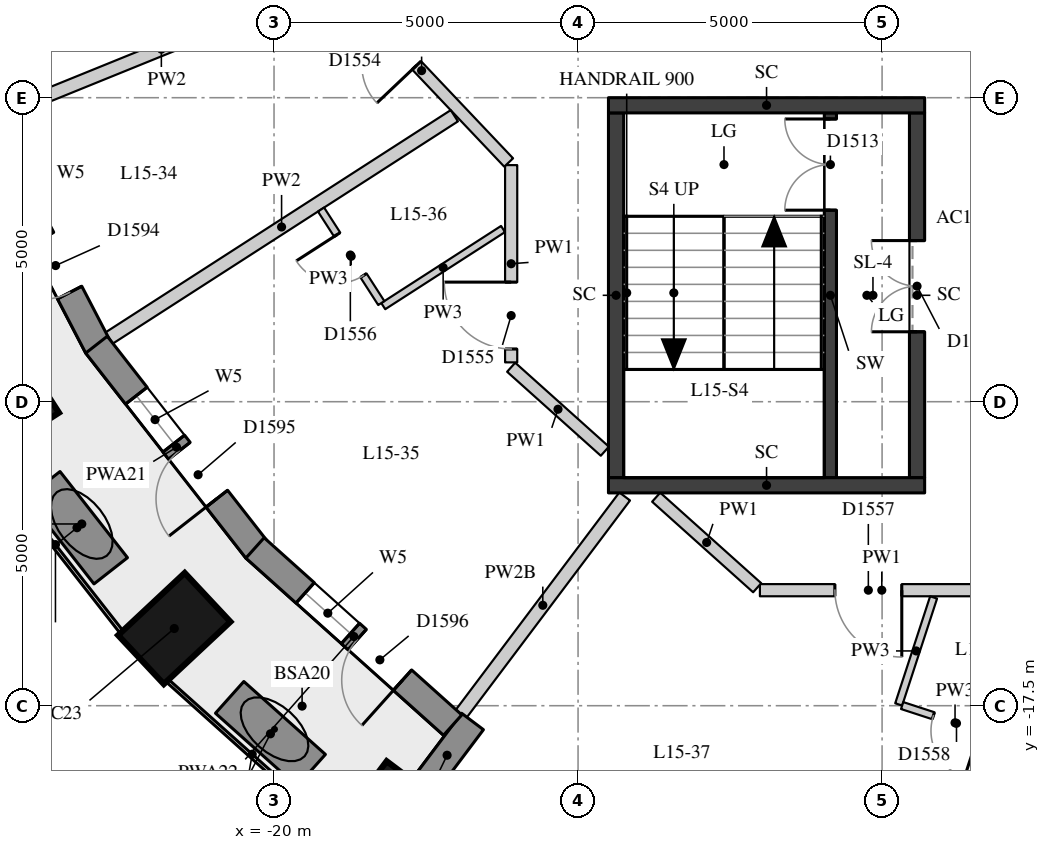
"""IFC4 building model, lengths in metres.
Left out: names, types, materials, properties, quantities, classifications, styles, units other than length and angle.
Written with IfcOpenShell. Run it as: python <this file> out.ifc"""

import sys

from ifc_helpers import new_model, si_unit, direction, frame, frame_2d, origin, origin_2d, place, context, subcontext, project, spatial, rectangle, extrude, element, fill, save


model = new_model("IFC4")
c1 = context("Model", 3, precision=1e-05, world=origin(), true_north=direction((0.0, 1.0)))
c2 = subcontext(c1, "Body", "Model", "MODEL_VIEW")
j1 = project(units=[si_unit("LENGTHUNIT", "METRE"), si_unit("PLANEANGLEUNIT", "RADIAN")], contexts=[c1])
p1 = place(None, origin())
s1 = spatial("IfcSite", under=j1, at=p1, CompositionType="ELEMENT")
p2 = place(p1, origin())
s2 = spatial("IfcBuilding", under=s1, at=p2, CompositionType="ELEMENT")
p3 = place(p2, frame((0.0, 0.0, 58.0)))
s3 = spatial("IfcBuildingStorey", under=s2, at=p3, CompositionType="ELEMENT", Elevation=58.0)
for number, where, z_axis, x_axis in (
    (1, (-24.465, -12.625, 0.0), (0.0, 0.0, 1.0), (-0.841, -0.541, 0.0)),
    (2, (-21.641, -16.23, 0.0), (0.0, 0.0, 1.0), (-0.73, -0.683, 0.0)),
    (3, (-18.159, -19.343, 0.0), (0.0, 0.0, 1.0), (-0.601, -0.799, 0.0)),
):
    element("IfcColumn", number, at=place(p3, frame(where, z_axis=z_axis, x_axis=x_axis)), inside=s3, PredefinedType="COLUMN", context=c2, shape_type="SweptSolid", body=[
        extrude(rectangle(XDim=1.5, YDim=1.1, at=origin_2d()), origin(), (0.0, 0.0, 1.0), 3.3),
    ])
p4 = place(p3, frame((-17.572, -18.871, 0.0), z_axis=(0.0, 0.0, 1.0), x_axis=(0.601262851241, 0.799051302306, 0.0)))
e4 = element("IfcWall", 4, at=p4, inside=s3, PredefinedType="SOLIDWALL", context=c2, shape_type="SweptSolid", body=[
    extrude(rectangle(XDim=1.391, YDim=0.45, at=frame_2d((0.696, 0.0))), origin(), (0.0, 0.0, 1.0), 2.57),
])
p5 = place(p3, frame((-24.818, -7.905, 0.0), z_axis=(0.0, 0.0, 1.0), x_axis=(0.461517123562, -0.887131300687, 0.0)))
e5 = element("IfcWall", 5, at=p5, inside=s3, PredefinedType="SOLIDWALL", context=c2, shape_type="SweptSolid", body=[
    extrude(rectangle(XDim=4.162, YDim=0.45, at=frame_2d((2.081, 0.0))), origin(), (0.0, 0.0, 1.0), 3.02),
])
p6 = place(p5, frame((1.006, 0.0, 0.4)))
e6 = element("IfcOpeningElement", 6, at=p6, cuts=e5, PredefinedType="OPENING", context=c2, shape_type="SweptSolid", body=[
    extrude(rectangle(XDim=1.0, YDim=1.75, at=frame_2d((0.5, 0.875))), frame((0.0, 0.235, 0.0), z_axis=(0.0, -1.0, 0.0), x_axis=(1.0, 0.0, 0.0)), (0.0, 0.0, 1.0), 0.47),
])
p7 = place(p5, frame((2.156, 0.0, 0.0)))
e7 = element("IfcOpeningElement", 7, at=p7, cuts=e5, PredefinedType="OPENING", context=c2, shape_type="SweptSolid", body=[
    extrude(rectangle(XDim=1.0, YDim=2.15, at=frame_2d((0.5, 1.075))), frame((0.0, 0.235, 0.0), z_axis=(0.0, -1.0, 0.0), x_axis=(1.0, 0.0, 0.0)), (0.0, 0.0, 1.0), 0.47),
])
p8 = place(p3, frame((-22.92, -11.562, 0.0), z_axis=(0.0, 0.0, 1.0), x_axis=(0.615586464456, -0.788069352772, 0.0)))
e8 = element("IfcWall", 8, at=p8, inside=s3, PredefinedType="SOLIDWALL", context=c2, shape_type="SweptSolid", body=[
    extrude(rectangle(XDim=4.279, YDim=0.45, at=frame_2d((2.139, 0.0))), origin(), (0.0, 0.0, 1.0), 3.02),
])
p9 = place(p8, frame((1.064, 0.0, 0.4)))
e9 = element("IfcOpeningElement", 9, at=p9, cuts=e8, PredefinedType="OPENING", context=c2, shape_type="SweptSolid", body=[
    extrude(rectangle(XDim=1.0, YDim=1.75, at=frame_2d((0.5, 0.875))), frame((0.0, 0.235, 0.0), z_axis=(0.0, -1.0, 0.0), x_axis=(1.0, 0.0, 0.0)), (0.0, 0.0, 1.0), 0.47),
])
p10 = place(p8, frame((2.214, 0.0, 0.0)))
e10 = element("IfcOpeningElement", 10, at=p10, cuts=e8, PredefinedType="OPENING", context=c2, shape_type="SweptSolid", body=[
    extrude(rectangle(XDim=1.0, YDim=2.15, at=frame_2d((0.5, 1.075))), frame((0.0, 0.235, 0.0), z_axis=(0.0, -1.0, 0.0), x_axis=(1.0, 0.0, 0.0)), (0.0, 0.0, 1.0), 0.47),
])
p11 = place(p3, frame((-20.313, -14.905, 0.0), z_axis=(0.0, 0.0, 1.0), x_axis=(0.744616407434, -0.667492626012, 0.0)))
e11 = element("IfcWall", 11, at=p11, inside=s3, PredefinedType="SOLIDWALL", context=c2, shape_type="SweptSolid", body=[
    extrude(rectangle(XDim=4.365, YDim=0.45, at=frame_2d((2.183, 0.0))), origin(), (0.0, 0.0, 1.0), 3.02),
])
p12 = place(p11, frame((1.108, 0.0, 0.4)))
e12 = element("IfcOpeningElement", 12, at=p12, cuts=e11, PredefinedType="OPENING", context=c2, shape_type="SweptSolid", body=[
    extrude(rectangle(XDim=1.0, YDim=1.75, at=frame_2d((0.5, 0.875))), frame((0.0, 0.235, 0.0), z_axis=(0.0, -1.0, 0.0), x_axis=(1.0, 0.0, 0.0)), (0.0, 0.0, 1.0), 0.47),
])
p13 = place(p11, frame((2.258, 0.0, 0.0)))
e13 = element("IfcOpeningElement", 13, at=p13, cuts=e11, PredefinedType="OPENING", context=c2, shape_type="SweptSolid", body=[
    extrude(rectangle(XDim=1.0, YDim=2.15, at=frame_2d((0.5, 1.075))), frame((0.0, 0.235, 0.0), z_axis=(0.0, -1.0, 0.0), x_axis=(1.0, 0.0, 0.0)), (0.0, 0.0, 1.0), 0.47),
])
p14 = place(p3, frame((-23.795, -13.864, 0.0), z_axis=(0.0, 0.0, 1.0), x_axis=(0.616622746332, -0.787258781282, 0.0)))
e14 = element("IfcWall", 14, at=p14, inside=s3, PredefinedType="USERDEFINED", context=c2, shape_type="SweptSolid", body=[
    extrude(rectangle(XDim=1.8, YDim=0.7, at=frame_2d((0.9, 0.0))), origin(), (0.0, 0.0, 1.0), 0.75),
])
p15 = place(p3, frame((-20.73, -17.363, 0.0), z_axis=(0.0, 0.0, 1.0), x_axis=(0.745535653445, -0.666465745139, 0.0)))
e15 = element("IfcWall", 15, at=p15, inside=s3, PredefinedType="USERDEFINED", context=c2, shape_type="SweptSolid", body=[
    extrude(rectangle(XDim=1.8, YDim=0.7, at=frame_2d((0.9, 0.0))), origin(), (0.0, 0.0, 1.0), 0.75),
])
p16 = place(p3, frame((-10.85, -13.75, 0.0), z_axis=(0.0, 0.0, 1.0), x_axis=(0.0, 1.0, 0.0)))
e16 = element("IfcWall", 16, at=p16, inside=s3, PredefinedType="SHEAR", context=c2, shape_type="SweptSolid", body=[
    extrude(rectangle(XDim=6.0, YDim=0.2, at=frame_2d((3.0, 0.0))), origin(), (0.0, 0.0, 1.0), 3.02),
])
p17 = place(p16, frame((4.4, 0.0, 0.0)))
e17 = element("IfcOpeningElement", 17, at=p17, cuts=e16, PredefinedType="OPENING", context=c2, shape_type="SweptSolid", body=[
    extrude(rectangle(XDim=1.5, YDim=2.1, at=frame_2d((0.75, 1.05))), frame((0.0, 0.11, 0.0), z_axis=(0.0, -1.0, 0.0), x_axis=(1.0, 0.0, 0.0)), (0.0, 0.0, 1.0), 0.22),
])
p18 = place(p3, frame((-14.375, -13.75, -0.28), z_axis=(0.0, 0.0, 1.0), x_axis=(0.0, 1.0, 0.0)))
e18 = element("IfcWall", 18, at=p18, inside=s3, PredefinedType="SHEAR", context=c2, shape_type="SweptSolid", body=[
    extrude(rectangle(XDim=6.0, YDim=0.25, at=frame_2d((3.0, 0.0))), origin(), (0.0, 0.0, 1.0), 3.3),
])
p19 = place(p3, frame((-9.425, -13.75, -0.28), z_axis=(0.0, 0.0, 1.0), x_axis=(0.0, 1.0, 0.0)))
e19 = element("IfcWall", 19, at=p19, inside=s3, PredefinedType="SHEAR", context=c2, shape_type="SweptSolid", body=[
    extrude(rectangle(XDim=6.0, YDim=0.25, at=frame_2d((3.0, 0.0))), origin(), (0.0, 0.0, 1.0), 3.3),
])
p20 = place(p19, frame((2.4, 0.0, 0.28)))
e20 = element("IfcOpeningElement", 20, at=p20, cuts=e19, PredefinedType="OPENING", context=c2, shape_type="SweptSolid", body=[
    extrude(rectangle(XDim=1.5, YDim=2.1, at=frame_2d((0.75, 1.05))), frame((0.0, 0.135, 0.0), z_axis=(0.0, -1.0, 0.0), x_axis=(1.0, 0.0, 0.0)), (0.0, 0.0, 1.0), 0.27),
])
for number, where, z_axis, x_axis in (
    (21, (-14.5, -7.625, -0.28), (0.0, 0.0, 1.0), (1.0, 0.0, 0.0)),
    (22, (-14.5, -13.875, -0.28), (0.0, 0.0, 1.0), (1.0, 0.0, 0.0)),
):
    element("IfcWall", number, at=place(p3, frame(where, z_axis=z_axis, x_axis=x_axis)), inside=s3, PredefinedType="SHEAR", context=c2, shape_type="SweptSolid", body=[
        extrude(rectangle(XDim=5.2, YDim=0.25, at=frame_2d((2.6, 0.0))), origin(), (0.0, 0.0, 1.0), 3.3),
    ])
p21 = place(p3, frame((-14.559, -13.314, 0.0), z_axis=(0.0, 0.0, 1.0), x_axis=(-0.744636171002, 0.667470578254, 0.0)))
e23 = element("IfcWall", 23, at=p21, inside=s3, PredefinedType="PARTITIONING", context=c2, shape_type="SweptSolid", body=[
    extrude(rectangle(XDim=2.069, YDim=0.2, at=frame_2d((1.035, 0.0))), origin(), (0.0, 0.0, 1.0), 3.02),
])
p22 = place(p3, frame((-16.1, -11.853, 0.0), z_axis=(0.0, 0.0, 1.0), x_axis=(0.0, 1.0, 0.0)))
e24 = element("IfcWall", 24, at=p22, inside=s3, PredefinedType="PARTITIONING", context=c2, shape_type="SweptSolid", body=[
    extrude(rectangle(XDim=3.244, YDim=0.2, at=frame_2d((1.622, 0.0))), origin(), (0.0, 0.0, 1.0), 3.02),
])
p23 = place(p22, frame((0.22, 0.0, 0.0)))
e25 = element("IfcOpeningElement", 25, at=p23, cuts=e24, PredefinedType="OPENING", context=c2, shape_type="SweptSolid", body=[
    extrude(rectangle(XDim=1.1, YDim=2.1, at=frame_2d((0.55, 1.05))), frame((0.0, 0.11, 0.0), z_axis=(0.0, -1.0, 0.0), x_axis=(1.0, 0.0, 0.0)), (0.0, 0.0, 1.0), 0.22),
])
p24 = place(p3, frame((-16.141, -8.566, 0.0), z_axis=(0.0, 0.0, 1.0), x_axis=(-0.687938220375, 0.725769250483, 0.0)))
e26 = element("IfcWall", 26, at=p24, inside=s3, PredefinedType="PARTITIONING", context=c2, shape_type="SweptSolid", body=[
    extrude(rectangle(XDim=4.162, YDim=0.2, at=frame_2d((2.081, 0.0))), origin(), (0.0, 0.0, 1.0), 3.02),
])
p25 = place(p24, frame((2.201, 0.0, 0.0)))
e27 = element("IfcOpeningElement", 27, at=p25, cuts=e26, PredefinedType="OPENING", context=c2, shape_type="SweptSolid", body=[
    extrude(rectangle(XDim=0.9, YDim=2.1, at=frame_2d((0.45, 1.05))), frame((0.0, 0.11, 0.0), z_axis=(0.0, -1.0, 0.0), x_axis=(1.0, 0.0, 0.0)), (0.0, 0.0, 1.0), 0.22),
])
p26 = place(p3, frame((-8.0, -15.6, 0.0), z_axis=(0.0, 0.0, 1.0), x_axis=(-1.0, 0.0, 0.0)))
e28 = element("IfcWall", 28, at=p26, inside=s3, PredefinedType="PARTITIONING", context=c2, shape_type="SweptSolid", body=[
    extrude(rectangle(XDim=4.009, YDim=0.2, at=frame_2d((2.005, 0.0))), origin(), (0.0, 0.0, 1.0), 3.02),
])
p27 = place(p26, frame((1.676, 0.0, 0.0)))
e29 = element("IfcOpeningElement", 29, at=p27, cuts=e28, PredefinedType="OPENING", context=c2, shape_type="SweptSolid", body=[
    extrude(rectangle(XDim=1.1, YDim=2.1, at=frame_2d((0.55, 1.05))), frame((0.0, 0.11, 0.0), z_axis=(0.0, -1.0, 0.0), x_axis=(1.0, 0.0, 0.0)), (0.0, 0.0, 1.0), 0.22),
])
p28 = place(p3, frame((-12.054, -15.56, 0.0), z_axis=(0.0, 0.0, 1.0), x_axis=(-0.744625700487, 0.66748225907, 0.0)))
e30 = element("IfcWall", 30, at=p28, inside=s3, PredefinedType="PARTITIONING", context=c2, shape_type="SweptSolid", body=[
    extrude(rectangle(XDim=2.231, YDim=0.2, at=frame_2d((1.116, 0.0))), origin(), (0.0, 0.0, 1.0), 3.02),
])
p29 = place(p3, frame((-24.609, -7.82, 0.0), z_axis=(0.0, 0.0, 1.0), x_axis=(0.926562262773, 0.376141427131, 0.0)))
e31 = element("IfcWall", 31, at=p29, inside=s3, PredefinedType="PARTITIONING", context=c2, shape_type="SweptSolid", body=[
    extrude(rectangle(XDim=5.948, YDim=0.22, at=frame_2d((2.974, 0.0))), origin(), (0.0, 0.0, 1.0), 3.02),
])
p30 = place(p3, frame((-22.717, -11.456, 0.0), z_axis=(0.0, 0.0, 1.0), x_axis=(0.840775666807, 0.541383669965, 0.0)))
e32 = element("IfcWall", 32, at=p30, inside=s3, PredefinedType="PARTITIONING", context=c2, shape_type="SweptSolid", body=[
    extrude(rectangle(XDim=6.759, YDim=0.22, at=frame_2d((3.379, 0.0))), origin(), (0.0, 0.0, 1.0), 3.02),
])
p31 = place(p3, frame((-16.927, -17.638, 0.0), z_axis=(0.0, 0.0, 1.0), x_axis=(0.601158965663, 0.799129462605, 0.0)))
e33 = element("IfcWall", 33, at=p31, inside=s3, PredefinedType="PARTITIONING", context=c2, shape_type="SweptSolid", body=[
    extrude(rectangle(XDim=4.48, YDim=0.22, at=frame_2d((2.24, 0.0))), origin(), (0.0, 0.0, 1.0), 2.57),
])
p32 = place(p3, frame((-9.429, -23.014, 0.0), z_axis=(0.0, 0.0, 1.0), x_axis=(0.310249775859, 0.950655077607, 0.0)))
e34 = element("IfcWall", 34, at=p32, inside=s3, PredefinedType="PARTITIONING", context=c2, shape_type="SweptSolid", body=[
    extrude(rectangle(XDim=7.85, YDim=0.22, at=frame_2d((3.925, 0.0))), origin(), (0.0, 0.0, 1.0), 3.02),
])
p33 = place(p3, frame((-16.234, -9.66, 0.0), z_axis=(0.0, 0.0, 1.0), x_axis=(-0.840731269954, -0.541452612628, 0.0)))
e35 = element("IfcWall", 35, at=p33, inside=s3, PredefinedType="PARTITIONING", context=c2, shape_type="SweptSolid", body=[
    extrude(rectangle(XDim=2.343, YDim=0.12, at=frame_2d((1.171, 0.0))), origin(), (0.0, 0.0, 1.0), 3.02),
])
p34 = place(p3, frame((-9.153, -15.719, 0.0), z_axis=(0.0, 0.0, 1.0), x_axis=(-0.310326382186, -0.950630073435, 0.0)))
e36 = element("IfcWall", 36, at=p34, inside=s3, PredefinedType="PARTITIONING", context=c2, shape_type="SweptSolid", body=[
    extrude(rectangle(XDim=1.851, YDim=0.12, at=frame_2d((0.926, 0.0))), origin(), (0.0, 0.0, 1.0), 3.02),
])
p35 = place(p3, frame((-18.236, -10.878, 0.0), z_axis=(0.0, 0.0, 1.0), x_axis=(-0.54164058606, 0.840610180484, 0.0)))
e37 = element("IfcWall", 37, at=p35, inside=s3, PredefinedType="PARTITIONING", context=c2, shape_type="SweptSolid", body=[
    extrude(rectangle(XDim=1.83, YDim=0.12, at=frame_2d((0.915, 0.0))), origin(), (0.0, 0.0, 1.0), 3.02),
])
p36 = place(p35, frame((0.54, 0.0, 0.0)))
e38 = element("IfcOpeningElement", 38, at=p36, cuts=e37, PredefinedType="OPENING", context=c2, shape_type="SweptSolid", body=[
    extrude(rectangle(XDim=0.8, YDim=2.1, at=frame_2d((0.4, 1.05))), frame((0.0, 0.07, 0.0), z_axis=(0.0, -1.0, 0.0), x_axis=(1.0, 0.0, 0.0)), (0.0, 0.0, 1.0), 0.14),
])
p37 = place(p3, frame((-9.67, -17.498, 0.0), z_axis=(0.0, 0.0, 1.0), x_axis=(0.950678536911, -0.31017788357, 0.0)))
e39 = element("IfcWall", 39, at=p37, inside=s3, PredefinedType="PARTITIONING", context=c2, shape_type="SweptSolid", body=[
    extrude(rectangle(XDim=1.83, YDim=0.12, at=frame_2d((0.915, 0.0))), origin(), (0.0, 0.0, 1.0), 3.02),
])
p38 = place(p37, frame((0.54, 0.0, 0.0)))
e40 = element("IfcOpeningElement", 40, at=p38, cuts=e39, PredefinedType="OPENING", context=c2, shape_type="SweptSolid", body=[
    extrude(rectangle(XDim=0.8, YDim=2.1, at=frame_2d((0.4, 1.05))), frame((0.0, 0.07, 0.0), z_axis=(0.0, -1.0, 0.0), x_axis=(1.0, 0.0, 0.0)), (0.0, 0.0, 1.0), 0.14),
])
p39 = place(p7, frame((1.0, 0.0, 0.0), z_axis=(0.0, 0.0, 1.0), x_axis=(-1.0, 0.0, 0.0)))
e41 = element("IfcDoor", 41, at=p39, inside=s3, OperationType="SINGLE_SWING_RIGHT", PredefinedType="DOOR", context=c2, shape_type="SweptSolid", body=[
    extrude(rectangle(XDim=1.0, YDim=2.15, at=frame_2d((0.5, 1.075))), frame((0.0, 0.075, 0.0), z_axis=(0.0, -1.0, 0.0), x_axis=(1.0, 0.0, 0.0)), (0.0, 0.0, 1.0), 0.05),
])
fill(e7, e41)
p40 = place(p9, origin())
e42 = element("IfcWindow", 42, at=p40, inside=s3, PartitioningType="SINGLE_PANEL", PredefinedType="WINDOW", context=c2, shape_type="SweptSolid", body=[
    extrude(rectangle(XDim=1.0, YDim=1.75, at=frame_2d((0.5, 0.875))), frame((0.0, 0.035, 0.0), z_axis=(0.0, -1.0, 0.0), x_axis=(1.0, 0.0, 0.0)), (0.0, 0.0, 1.0), 0.06),
])
fill(e9, e42)
p41 = place(p10, frame((1.0, 0.0, 0.0), z_axis=(0.0, 0.0, 1.0), x_axis=(-1.0, 0.0, 0.0)))
e43 = element("IfcDoor", 43, at=p41, inside=s3, OperationType="SINGLE_SWING_LEFT", PredefinedType="DOOR", context=c2, shape_type="SweptSolid", body=[
    extrude(rectangle(XDim=1.0, YDim=2.15, at=frame_2d((0.5, 1.075))), frame((0.0, 0.075, 0.0), z_axis=(0.0, -1.0, 0.0), x_axis=(1.0, 0.0, 0.0)), (0.0, 0.0, 1.0), 0.05),
])
fill(e10, e43)
p42 = place(p12, origin())
e44 = element("IfcWindow", 44, at=p42, inside=s3, PartitioningType="SINGLE_PANEL", PredefinedType="WINDOW", context=c2, shape_type="SweptSolid", body=[
    extrude(rectangle(XDim=1.0, YDim=1.75, at=frame_2d((0.5, 0.875))), frame((0.0, 0.035, 0.0), z_axis=(0.0, -1.0, 0.0), x_axis=(1.0, 0.0, 0.0)), (0.0, 0.0, 1.0), 0.06),
])
fill(e12, e44)
p43 = place(p13, frame((1.0, 0.0, 0.0), z_axis=(0.0, 0.0, 1.0), x_axis=(-1.0, 0.0, 0.0)))
e45 = element("IfcDoor", 45, at=p43, inside=s3, OperationType="SINGLE_SWING_LEFT", PredefinedType="DOOR", context=c2, shape_type="SweptSolid", body=[
    extrude(rectangle(XDim=1.0, YDim=2.15, at=frame_2d((0.5, 1.075))), frame((0.0, 0.075, 0.0), z_axis=(0.0, -1.0, 0.0), x_axis=(1.0, 0.0, 0.0)), (0.0, 0.0, 1.0), 0.05),
])
fill(e13, e45)
p44 = place(p17, origin())
e46 = element("IfcDoor", 46, at=p44, inside=s3, OperationType="DOUBLE_DOOR_SINGLE_SWING", PredefinedType="DOOR", context=c2, shape_type="SweptSolid", body=[
    extrude(rectangle(XDim=1.5, YDim=2.1, at=frame_2d((0.75, 1.05))), frame((0.0, 0.025, 0.0), z_axis=(0.0, -1.0, 0.0), x_axis=(1.0, 0.0, 0.0)), (0.0, 0.0, 1.0), 0.05),
])
fill(e17, e46)
p45 = place(p20, origin())
e47 = element("IfcDoor", 47, at=p45, inside=s3, OperationType="DOUBLE_DOOR_SINGLE_SWING", PredefinedType="DOOR", context=c2, shape_type="SweptSolid", body=[
    extrude(rectangle(XDim=1.5, YDim=2.1, at=frame_2d((0.75, 1.05))), frame((0.0, 0.025, 0.0), z_axis=(0.0, -1.0, 0.0), x_axis=(1.0, 0.0, 0.0)), (0.0, 0.0, 1.0), 0.05),
])
fill(e20, e47)
p46 = place(p25, origin())
e48 = element("IfcDoor", 48, at=p46, inside=s3, OperationType="SINGLE_SWING_LEFT", PredefinedType="DOOR", context=c2, shape_type="SweptSolid", body=[
    extrude(rectangle(XDim=0.9, YDim=2.1, at=frame_2d((0.45, 1.05))), frame((0.0, 0.025, 0.0), z_axis=(0.0, -1.0, 0.0), x_axis=(1.0, 0.0, 0.0)), (0.0, 0.0, 1.0), 0.05),
])
fill(e27, e48)
p47 = place(p23, origin())
e49 = element("IfcDoor", 49, at=p47, inside=s3, OperationType="SINGLE_SWING_RIGHT", PredefinedType="DOOR", context=c2, shape_type="SweptSolid", body=[
    extrude(rectangle(XDim=1.1, YDim=2.1, at=frame_2d((0.55, 1.05))), frame((0.0, 0.025, 0.0), z_axis=(0.0, -1.0, 0.0), x_axis=(1.0, 0.0, 0.0)), (0.0, 0.0, 1.0), 0.05),
])
fill(e25, e49)
p48 = place(p36, origin())
e50 = element("IfcDoor", 50, at=p48, inside=s3, OperationType="SINGLE_SWING_RIGHT", PredefinedType="DOOR", context=c2, shape_type="SweptSolid", body=[
    extrude(rectangle(XDim=0.8, YDim=2.1, at=frame_2d((0.4, 1.05))), frame((0.0, 0.025, 0.0), z_axis=(0.0, -1.0, 0.0), x_axis=(1.0, 0.0, 0.0)), (0.0, 0.0, 1.0), 0.05),
])
fill(e38, e50)
p49 = place(p27, origin())
e51 = element("IfcDoor", 51, at=p49, inside=s3, OperationType="SINGLE_SWING_LEFT", PredefinedType="DOOR", context=c2, shape_type="SweptSolid", body=[
    extrude(rectangle(XDim=1.1, YDim=2.1, at=frame_2d((0.55, 1.05))), frame((0.0, 0.025, 0.0), z_axis=(0.0, -1.0, 0.0), x_axis=(1.0, 0.0, 0.0)), (0.0, 0.0, 1.0), 0.05),
])
fill(e29, e51)
p50 = place(p38, origin())
e52 = element("IfcDoor", 52, at=p50, inside=s3, OperationType="SINGLE_SWING_LEFT", PredefinedType="DOOR", context=c2, shape_type="SweptSolid", body=[
    extrude(rectangle(XDim=0.8, YDim=2.1, at=frame_2d((0.4, 1.05))), frame((0.0, 0.025, 0.0), z_axis=(0.0, -1.0, 0.0), x_axis=(1.0, 0.0, 0.0)), (0.0, 0.0, 1.0), 0.05),
])
fill(e40, e52)
save(model, sys.argv[1])
